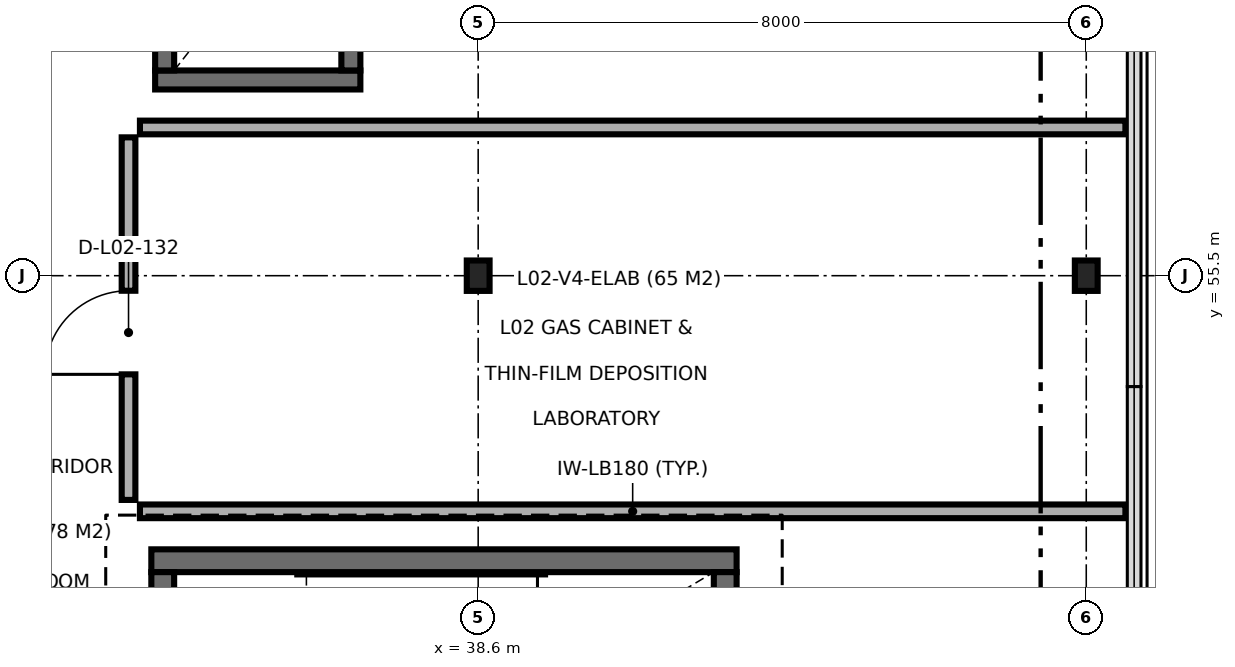
"""IFC4 building model, lengths in metres.
Left out: names, types, materials, properties, quantities, classifications, styles, units other than length and angle.
Written with IfcOpenShell. Run it as: python <this file> out.ifc"""

import sys

from ifc_helpers import new_model, si_unit, direction, frame, frame_2d, origin, origin_2d, place, context, subcontext, project, spatial, rectangle, i_section, extrude, element, fill, save


model = new_model("IFC4")
c1 = context("Model", 3, precision=1e-05, world=origin(), true_north=direction((0.0, 1.0)))
c2 = subcontext(c1, "Body", "Model", "MODEL_VIEW")
j1 = project(units=[si_unit("LENGTHUNIT", "METRE"), si_unit("PLANEANGLEUNIT", "RADIAN")], contexts=[c1])
p1 = place(None, origin())
s1 = spatial("IfcSite", under=j1, at=p1, CompositionType="ELEMENT")
p2 = place(p1, origin())
s2 = spatial("IfcBuilding", under=s1, at=p2, CompositionType="ELEMENT")
p3 = place(p2, frame((0.0, 0.0, 9.3)))
s3 = spatial("IfcBuildingStorey", under=s2, at=p3, CompositionType="ELEMENT", Elevation=9.3)
for number, where, z_axis, x_axis in (
    (1, (38.6, 55.5, 0.0), (0.0, 0.0, 1.0), (1.0, 0.0, 0.0)),
    (2, (46.6, 55.5, 0.0), (0.0, 0.0, 1.0), (1.0, 0.0, 0.0)),
):
    element("IfcColumn", number, at=place(p3, frame(where, z_axis=z_axis, x_axis=x_axis)), inside=s3, PredefinedType="COLUMN", context=c2, shape_type="SweptSolid", body=[
        extrude(i_section(OverallWidth=0.3, OverallDepth=0.4, WebThickness=0.013, FlangeThickness=0.024, FilletRadius=0.027, at=origin_2d()), origin(), (0.0, 0.0, 1.0), 4.5),
    ])
p4 = place(p3, frame((42.0, 51.75, 0.0), z_axis=(0.0, 0.0, 1.0), x_axis=(-1.0, 0.0, 0.0)))
e3 = element("IfcWall", 3, at=p4, inside=s3, PredefinedType="SHEAR", context=c2, shape_type="SweptSolid", body=[
    extrude(rectangle(XDim=7.7, YDim=0.3, at=frame_2d((3.85, 0.0))), origin(), (0.0, 0.0, 1.0), 4.5),
])
p5 = place(p3, frame((34.45, 51.6, 0.0), z_axis=(0.0, 0.0, 1.0), x_axis=(0.0, -1.0, 0.0)))
e4 = element("IfcWall", 4, at=p5, inside=s3, PredefinedType="SHEAR", context=c2, shape_type="SweptSolid", body=[
    extrude(rectangle(XDim=3.2, YDim=0.3, at=frame_2d((1.6, 0.0))), origin(), (0.0, 0.0, 1.0), 4.5),
])
p6 = place(p5, frame((1.0, 0.0, 0.0)))
e5 = element("IfcOpeningElement", 5, at=p6, cuts=e4, PredefinedType="OPENING", context=c2, shape_type="SweptSolid", body=[
    extrude(rectangle(XDim=1.2, YDim=2.15, at=frame_2d((0.6, 1.075))), frame((0.0, 0.16, 0.0), z_axis=(0.0, -1.0, 0.0), x_axis=(1.0, 0.0, 0.0)), (0.0, 0.0, 1.0), 0.32),
])
p7 = place(p3, frame((41.85, 48.4, 0.0), z_axis=(0.0, 0.0, 1.0), x_axis=(0.0, 1.0, 0.0)))
e6 = element("IfcWall", 6, at=p7, inside=s3, PredefinedType="SHEAR", context=c2, shape_type="SweptSolid", body=[
    extrude(rectangle(XDim=3.2, YDim=0.3, at=frame_2d((1.6, 0.0))), origin(), (0.0, 0.0, 1.0), 4.5),
])
p8 = place(p3, frame((34.35, 58.075, 0.0), z_axis=(0.0, 0.0, 1.0), x_axis=(1.0, 0.0, 0.0)))
e7 = element("IfcWall", 7, at=p8, inside=s3, PredefinedType="SHEAR", context=c2, shape_type="SweptSolid", body=[
    extrude(rectangle(XDim=2.7, YDim=0.25, at=frame_2d((1.35, 0.0))), origin(), (0.0, 0.0, 1.0), 4.5),
])
p9 = place(p3, frame((34.475, 61.0, 0.0), z_axis=(0.0, 0.0, 1.0), x_axis=(0.0, -1.0, 0.0)))
e8 = element("IfcWall", 8, at=p9, inside=s3, PredefinedType="SHEAR", context=c2, shape_type="SweptSolid", body=[
    extrude(rectangle(XDim=2.8, YDim=0.25, at=frame_2d((1.4, 0.0))), origin(), (0.0, 0.0, 1.0), 4.5),
])
p10 = place(p9, frame((0.85, 0.0, 0.0)))
e9 = element("IfcOpeningElement", 9, at=p10, cuts=e8, PredefinedType="OPENING", context=c2, shape_type="SweptSolid", body=[
    extrude(rectangle(XDim=1.1, YDim=2.15, at=frame_2d((0.55, 1.075))), frame((0.0, 0.135, 0.0), z_axis=(0.0, -1.0, 0.0), x_axis=(1.0, 0.0, 0.0)), (0.0, 0.0, 1.0), 0.27),
])
p11 = place(p3, frame((36.925, 58.2, 0.0), z_axis=(0.0, 0.0, 1.0), x_axis=(0.0, 1.0, 0.0)))
e10 = element("IfcWall", 10, at=p11, inside=s3, PredefinedType="SHEAR", context=c2, shape_type="SweptSolid", body=[
    extrude(rectangle(XDim=2.8, YDim=0.25, at=frame_2d((1.4, 0.0))), origin(), (0.0, 0.0, 1.0), 4.5),
])
for number, where, z_axis, x_axis in (
    (11, (34.15, 52.4, 0.0), (0.0, 0.0, 1.0), (1.0, 0.0, 0.0)),
    (12, (34.15, 57.45, 0.0), (0.0, 0.0, 1.0), (1.0, 0.0, 0.0)),
):
    element("IfcWall", number, at=place(p3, frame(where, z_axis=z_axis, x_axis=x_axis)), inside=s3, PredefinedType="PARTITIONING", context=c2, shape_type="SweptSolid", body=[
        extrude(rectangle(XDim=12.965, YDim=0.18, at=frame_2d((6.482, 0.0))), origin(), (0.0, 0.0, 1.0), 4.25),
    ])
p12 = place(p3, frame((34.0, 52.55, 0.0), z_axis=(0.0, 0.0, 1.0), x_axis=(0.0, 1.0, 0.0)))
e13 = element("IfcWall", 13, at=p12, inside=s3, PredefinedType="PARTITIONING", context=c2, shape_type="SweptSolid", body=[
    extrude(rectangle(XDim=4.77, YDim=0.18, at=frame_2d((2.385, 0.0))), origin(), (0.0, 0.0, 1.0), 4.25),
])
p13 = place(p12, frame((1.652, 0.0, 0.0)))
e14 = element("IfcOpeningElement", 14, at=p13, cuts=e13, PredefinedType="OPENING", context=c2, shape_type="SweptSolid", body=[
    extrude(rectangle(XDim=1.1, YDim=2.15, at=frame_2d((0.55, 1.075))), frame((0.0, 0.1, 0.0), z_axis=(0.0, -1.0, 0.0), x_axis=(1.0, 0.0, 0.0)), (0.0, 0.0, 1.0), 0.2),
])
p14 = place(p13, origin())
e15 = element("IfcDoor", 15, at=p14, inside=s3, OperationType="SINGLE_SWING_LEFT", PredefinedType="DOOR", context=c2, shape_type="SweptSolid", body=[
    extrude(rectangle(XDim=1.1, YDim=2.15, at=frame_2d((0.55, 1.075))), frame((0.0, 0.025, 0.0), z_axis=(0.0, -1.0, 0.0), x_axis=(1.0, 0.0, 0.0)), (0.0, 0.0, 1.0), 0.05),
])
fill(e14, e15)
save(model, sys.argv[1])
